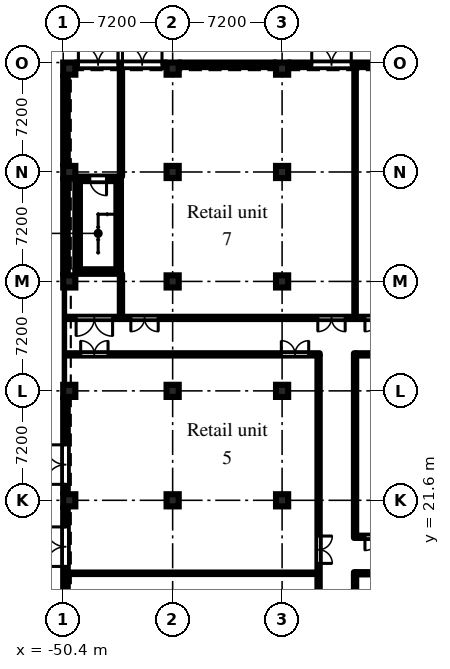
"""IFC4 building model, lengths in metres.
Left out: names, types, materials, properties, quantities, classifications, styles, units other than length and angle.
Written with IfcOpenShell. Run it as: python <this file> out.ifc"""

import sys

from ifc_helpers import new_model, si_unit, direction, frame, frame_2d, origin, origin_2d, place, context, subcontext, project, spatial, rectangle, extrude, element, fill, save


model = new_model("IFC4")
c1 = context("Model", 3, precision=1e-05, world=origin(), true_north=direction((0.0, 1.0)))
c2 = subcontext(c1, "Body", "Model", "MODEL_VIEW")
j1 = project(units=[si_unit("LENGTHUNIT", "METRE"), si_unit("PLANEANGLEUNIT", "RADIAN")], contexts=[c1])
p1 = place(None, origin())
s1 = spatial("IfcSite", under=j1, at=p1, CompositionType="ELEMENT")
p2 = place(p1, origin())
s2 = spatial("IfcBuilding", under=s1, at=p2, CompositionType="ELEMENT")
p3 = place(p2, origin())
s3 = spatial("IfcBuildingStorey", under=s2, at=p3, CompositionType="ELEMENT", Elevation=0.0)
for number, where, z_axis, x_axis in (
    (1, (-50.0, 21.6, 0.0), (0.0, 0.0, 1.0), (1.0, 0.0, 0.0)),
    (2, (-50.0, 28.8, 0.0), (0.0, 0.0, 1.0), (1.0, 0.0, 0.0)),
    (3, (-50.0, 36.0, 0.0), (0.0, 0.0, 1.0), (1.0, 0.0, 0.0)),
    (4, (-50.0, 43.2, 0.0), (0.0, 0.0, 1.0), (1.0, 0.0, 0.0)),
    (5, (-50.0, 50.0, 0.0), (0.0, 0.0, 1.0), (1.0, 0.0, 0.0)),
    (6, (-43.2, 21.6, 0.0), (0.0, 0.0, 1.0), (1.0, 0.0, 0.0)),
    (7, (-43.2, 28.8, 0.0), (0.0, 0.0, 1.0), (1.0, 0.0, 0.0)),
    (8, (-43.2, 36.0, 0.0), (0.0, 0.0, 1.0), (1.0, 0.0, 0.0)),
    (9, (-43.2, 43.2, 0.0), (0.0, 0.0, 1.0), (1.0, 0.0, 0.0)),
    (10, (-43.2, 50.0, 0.0), (0.0, 0.0, 1.0), (1.0, 0.0, 0.0)),
    (11, (-36.0, 21.6, 0.0), (0.0, 0.0, 1.0), (1.0, 0.0, 0.0)),
    (12, (-36.0, 28.8, 0.0), (0.0, 0.0, 1.0), (1.0, 0.0, 0.0)),
    (13, (-36.0, 36.0, 0.0), (0.0, 0.0, 1.0), (1.0, 0.0, 0.0)),
    (14, (-36.0, 43.2, 0.0), (0.0, 0.0, 1.0), (1.0, 0.0, 0.0)),
    (15, (-36.0, 50.0, 0.0), (0.0, 0.0, 1.0), (1.0, 0.0, 0.0)),
):
    element("IfcColumn", number, at=place(p3, frame(where, z_axis=z_axis, x_axis=x_axis)), inside=s3, PredefinedType="COLUMN", context=c2, shape_type="SweptSolid", body=[
        extrude(rectangle(XDim=0.8, YDim=0.8, at=origin_2d()), origin(), (0.0, 0.0, 1.0), 6.6),
    ])
p4 = place(p3, frame((-29.2, 50.25, 0.0), z_axis=(0.0, 0.0, 1.0), x_axis=(-1.0, 0.0, 0.0)))
e16 = element("IfcWall", 16, at=p4, inside=s3, PredefinedType="SOLIDWALL", context=c2, shape_type="SweptSolid", body=[
    extrude(rectangle(XDim=6.4, YDim=0.3, at=frame_2d((3.2, 0.0))), origin(), (0.0, 0.0, 1.0), 6.6),
])
p5 = place(p4, frame((2.25, 0.0, 0.0)))
e17 = element("IfcOpeningElement", 17, at=p5, cuts=e16, PredefinedType="OPENING", context=c2, shape_type="SweptSolid", body=[
    extrude(rectangle(XDim=2.6, YDim=2.4, at=frame_2d((1.3, 1.2))), frame((0.0, 0.16, 0.0), z_axis=(0.0, -1.0, 0.0), x_axis=(1.0, 0.0, 0.0)), (0.0, 0.0, 1.0), 0.32),
])
p6 = place(p3, frame((-36.4, 50.25, 0.0), z_axis=(0.0, 0.0, 1.0), x_axis=(-1.0, 0.0, 0.0)))
e18 = element("IfcWall", 18, at=p6, inside=s3, PredefinedType="SOLIDWALL", context=c2, shape_type="SweptSolid", body=[
    extrude(rectangle(XDim=6.4, YDim=0.3, at=frame_2d((3.2, 0.0))), origin(), (0.0, 0.0, 1.0), 6.6),
])
p7 = place(p3, frame((-43.6, 50.25, 0.0), z_axis=(0.0, 0.0, 1.0), x_axis=(-1.0, 0.0, 0.0)))
e19 = element("IfcWall", 19, at=p7, inside=s3, PredefinedType="SOLIDWALL", context=c2, shape_type="SweptSolid", body=[
    extrude(rectangle(XDim=6.0, YDim=0.3, at=frame_2d((3.0, 0.0))), origin(), (0.0, 0.0, 1.0), 6.6),
])
p8 = place(p7, frame((0.3, 0.0, 0.0)))
e20 = element("IfcOpeningElement", 20, at=p8, cuts=e19, PredefinedType="OPENING", context=c2, shape_type="SweptSolid", body=[
    extrude(rectangle(XDim=2.6, YDim=2.4, at=frame_2d((1.3, 1.2))), frame((0.0, 0.16, 0.0), z_axis=(0.0, -1.0, 0.0), x_axis=(1.0, 0.0, 0.0)), (0.0, 0.0, 1.0), 0.32),
])
p9 = place(p7, frame((3.2, 0.0, 0.0)))
e21 = element("IfcOpeningElement", 21, at=p9, cuts=e19, PredefinedType="OPENING", context=c2, shape_type="SweptSolid", body=[
    extrude(rectangle(XDim=2.6, YDim=2.4, at=frame_2d((1.3, 1.2))), frame((0.0, 0.16, 0.0), z_axis=(0.0, -1.0, 0.0), x_axis=(1.0, 0.0, 0.0)), (0.0, 0.0, 1.0), 0.32),
])
p10 = place(p3, frame((-50.25, 49.6, 0.0), z_axis=(0.0, 0.0, 1.0), x_axis=(0.0, -1.0, 0.0)))
e22 = element("IfcWall", 22, at=p10, inside=s3, PredefinedType="SOLIDWALL", context=c2, shape_type="SweptSolid", body=[
    extrude(rectangle(XDim=6.0, YDim=0.3, at=frame_2d((3.0, 0.0))), origin(), (0.0, 0.0, 1.0), 6.6),
])
p11 = place(p3, frame((-50.25, 42.8, 0.0), z_axis=(0.0, 0.0, 1.0), x_axis=(0.0, -1.0, 0.0)))
e23 = element("IfcWall", 23, at=p11, inside=s3, PredefinedType="SOLIDWALL", context=c2, shape_type="SweptSolid", body=[
    extrude(rectangle(XDim=6.4, YDim=0.3, at=frame_2d((3.2, 0.0))), origin(), (0.0, 0.0, 1.0), 6.6),
])
p12 = place(p3, frame((-50.25, 28.4, 0.0), z_axis=(0.0, 0.0, 1.0), x_axis=(0.0, -1.0, 0.0)))
e24 = element("IfcWall", 24, at=p12, inside=s3, PredefinedType="SOLIDWALL", context=c2, shape_type="SweptSolid", body=[
    extrude(rectangle(XDim=6.4, YDim=0.3, at=frame_2d((3.2, 0.0))), origin(), (0.0, 0.0, 1.0), 6.6),
])
p13 = place(p12, frame((3.15, 0.0, 0.0)))
e25 = element("IfcOpeningElement", 25, at=p13, cuts=e24, PredefinedType="OPENING", context=c2, shape_type="SweptSolid", body=[
    extrude(rectangle(XDim=2.6, YDim=2.4, at=frame_2d((1.3, 1.2))), frame((0.0, 0.16, 0.0), z_axis=(0.0, -1.0, 0.0), x_axis=(1.0, 0.0, 0.0)), (0.0, 0.0, 1.0), 0.32),
])
p14 = place(p3, frame((-50.25, 21.2, 0.0), z_axis=(0.0, 0.0, 1.0), x_axis=(0.0, -1.0, 0.0)))
e26 = element("IfcWall", 26, at=p14, inside=s3, PredefinedType="SOLIDWALL", context=c2, shape_type="SweptSolid", body=[
    extrude(rectangle(XDim=6.4, YDim=0.3, at=frame_2d((3.2, 0.0))), origin(), (0.0, 0.0, 1.0), 6.6),
])
p15 = place(p14, frame((1.35, 0.0, 0.0)))
e27 = element("IfcOpeningElement", 27, at=p15, cuts=e26, PredefinedType="OPENING", context=c2, shape_type="SweptSolid", body=[
    extrude(rectangle(XDim=2.6, YDim=2.4, at=frame_2d((1.3, 1.2))), frame((0.0, 0.16, 0.0), z_axis=(0.0, -1.0, 0.0), x_axis=(1.0, 0.0, 0.0)), (0.0, 0.0, 1.0), 0.32),
])
p16 = place(p3, frame((-49.6, 36.65, 0.0), z_axis=(0.0, 0.0, 1.0), x_axis=(1.0, 0.0, 0.0)))
e28 = element("IfcWall", 28, at=p16, inside=s3, PredefinedType="SHEAR", context=c2, shape_type="SweptSolid", body=[
    extrude(rectangle(XDim=3.0, YDim=0.3, at=frame_2d((1.5, 0.0))), origin(), (0.0, 0.0, 1.0), 6.6),
])
p17 = place(p3, frame((-49.6, 42.75, 0.0), z_axis=(0.0, 0.0, 1.0), x_axis=(1.0, 0.0, 0.0)))
e29 = element("IfcWall", 29, at=p17, inside=s3, PredefinedType="SHEAR", context=c2, shape_type="SweptSolid", body=[
    extrude(rectangle(XDim=3.0, YDim=0.3, at=frame_2d((1.5, 0.0))), origin(), (0.0, 0.0, 1.0), 6.6),
])
p18 = place(p17, frame((0.95, 0.0, 0.0)))
e30 = element("IfcOpeningElement", 30, at=p18, cuts=e29, PredefinedType="OPENING", context=c2, shape_type="SweptSolid", body=[
    extrude(rectangle(XDim=1.1, YDim=2.1, at=frame_2d((0.55, 1.05))), frame((0.0, 0.16, 0.0), z_axis=(0.0, -1.0, 0.0), x_axis=(1.0, 0.0, 0.0)), (0.0, 0.0, 1.0), 0.32),
])
for number, where, z_axis, x_axis in (
    (31, (-49.45, 36.8, 0.0), (0.0, 0.0, 1.0), (0.0, 1.0, 0.0)),
    (32, (-46.75, 36.8, 0.0), (0.0, 0.0, 1.0), (0.0, 1.0, 0.0)),
):
    element("IfcWall", number, at=place(p3, frame(where, z_axis=z_axis, x_axis=x_axis)), inside=s3, PredefinedType="SHEAR", context=c2, shape_type="SweptSolid", body=[
        extrude(rectangle(XDim=5.8, YDim=0.3, at=frame_2d((2.9, 0.0))), origin(), (0.0, 0.0, 1.0), 6.6),
    ])
p19 = place(p3, frame((-50.22, 16.8, 0.0), z_axis=(0.0, 0.0, 1.0), x_axis=(1.0, 0.0, 0.0)))
e33 = element("IfcWall", 33, at=p19, inside=s3, PredefinedType="PARTITIONING", context=c2, shape_type="SweptSolid", body=[
    extrude(rectangle(XDim=16.545, YDim=0.1, at=frame_2d((8.272, 0.0))), origin(), (0.0, 0.0, 1.0), 6.6),
])
p20 = place(p3, frame((-50.22, 31.2, 0.0), z_axis=(0.0, 0.0, 1.0), x_axis=(1.0, 0.0, 0.0)))
e34 = element("IfcWall", 34, at=p20, inside=s3, PredefinedType="PARTITIONING", context=c2, shape_type="SweptSolid", body=[
    extrude(rectangle(XDim=16.695, YDim=0.15, at=frame_2d((8.348, 0.0))), origin(), (0.0, 0.0, 1.0), 6.6),
])
p21 = place(p20, frame((0.97, 0.0, 0.0)))
e35 = element("IfcOpeningElement", 35, at=p21, cuts=e34, PredefinedType="OPENING", context=c2, shape_type="SweptSolid", body=[
    extrude(rectangle(XDim=1.8, YDim=2.1, at=frame_2d((0.9, 1.05))), frame((0.0, 0.085, 0.0), z_axis=(0.0, -1.0, 0.0), x_axis=(1.0, 0.0, 0.0)), (0.0, 0.0, 1.0), 0.17),
])
p22 = place(p20, frame((14.17, 0.0, 0.0)))
e36 = element("IfcOpeningElement", 36, at=p22, cuts=e34, PredefinedType="OPENING", context=c2, shape_type="SweptSolid", body=[
    extrude(rectangle(XDim=1.8, YDim=2.1, at=frame_2d((0.9, 1.05))), frame((0.0, 0.085, 0.0), z_axis=(0.0, -1.0, 0.0), x_axis=(1.0, 0.0, 0.0)), (0.0, 0.0, 1.0), 0.17),
])
p23 = place(p3, frame((-50.22, 33.6, 0.0), z_axis=(0.0, 0.0, 1.0), x_axis=(1.0, 0.0, 0.0)))
e37 = element("IfcWall", 37, at=p23, inside=s3, PredefinedType="PARTITIONING", context=c2, shape_type="SweptSolid", body=[
    extrude(rectangle(XDim=31.695, YDim=0.15, at=frame_2d((15.848, 0.0))), origin(), (0.0, 0.0, 1.0), 6.6),
])
p24 = place(p23, frame((0.67, 0.0, 0.0)))
e38 = element("IfcOpeningElement", 38, at=p24, cuts=e37, PredefinedType="OPENING", context=c2, shape_type="SweptSolid", body=[
    extrude(rectangle(XDim=2.4, YDim=2.1, at=frame_2d((1.2, 1.05))), frame((0.0, 0.085, 0.0), z_axis=(0.0, -1.0, 0.0), x_axis=(1.0, 0.0, 0.0)), (0.0, 0.0, 1.0), 0.17),
])
p25 = place(p23, frame((19.67, 0.0, 0.0)))
e39 = element("IfcOpeningElement", 39, at=p25, cuts=e37, PredefinedType="OPENING", context=c2, shape_type="SweptSolid", body=[
    extrude(rectangle(XDim=1.8, YDim=2.1, at=frame_2d((0.9, 1.05))), frame((0.0, 0.085, 0.0), z_axis=(0.0, -1.0, 0.0), x_axis=(1.0, 0.0, 0.0)), (0.0, 0.0, 1.0), 0.17),
])
p26 = place(p23, frame((4.27, 0.0, 0.0)))
e40 = element("IfcOpeningElement", 40, at=p26, cuts=e37, PredefinedType="OPENING", context=c2, shape_type="SweptSolid", body=[
    extrude(rectangle(XDim=1.8, YDim=2.1, at=frame_2d((0.9, 1.05))), frame((0.0, 0.085, 0.0), z_axis=(0.0, -1.0, 0.0), x_axis=(1.0, 0.0, 0.0)), (0.0, 0.0, 1.0), 0.17),
])
p27 = place(p23, frame((16.57, 0.0, 0.0)))
e41 = element("IfcOpeningElement", 41, at=p27, cuts=e37, PredefinedType="OPENING", context=c2, shape_type="SweptSolid", body=[
    extrude(rectangle(XDim=1.8, YDim=2.1, at=frame_2d((0.9, 1.05))), frame((0.0, 0.085, 0.0), z_axis=(0.0, -1.0, 0.0), x_axis=(1.0, 0.0, 0.0)), (0.0, 0.0, 1.0), 0.17),
])
p28 = place(p3, frame((-46.6, 33.675, 0.0), z_axis=(0.0, 0.0, 1.0), x_axis=(0.0, 1.0, 0.0)))
e42 = element("IfcWall", 42, at=p28, inside=s3, PredefinedType="PARTITIONING", context=c2, shape_type="SweptSolid", body=[
    extrude(rectangle(XDim=2.825, YDim=0.15, at=frame_2d((1.413, 0.0))), origin(), (0.0, 0.0, 1.0), 6.6),
])
p29 = place(p3, frame((-46.6, 42.9, 0.0), z_axis=(0.0, 0.0, 1.0), x_axis=(0.0, 1.0, 0.0)))
e43 = element("IfcWall", 43, at=p29, inside=s3, PredefinedType="PARTITIONING", context=c2, shape_type="SweptSolid", body=[
    extrude(rectangle(XDim=7.32, YDim=0.15, at=frame_2d((3.66, 0.0))), origin(), (0.0, 0.0, 1.0), 6.6),
])
p30 = place(p3, frame((-33.6, 10.325, 0.0), z_axis=(0.0, 0.0, 1.0), x_axis=(0.0, 1.0, 0.0)))
e44 = element("IfcWall", 44, at=p30, inside=s3, PredefinedType="PARTITIONING", context=c2, shape_type="SweptSolid", body=[
    extrude(rectangle(XDim=20.8, YDim=0.15, at=frame_2d((10.4, 0.0))), origin(), (0.0, 0.0, 1.0), 6.6),
])
p31 = place(p30, frame((3.425, 0.0, 0.0)))
e45 = element("IfcOpeningElement", 45, at=p31, cuts=e44, PredefinedType="OPENING", context=c2, shape_type="SweptSolid", body=[
    extrude(rectangle(XDim=1.8, YDim=2.1, at=frame_2d((0.9, 1.05))), frame((0.0, 0.085, 0.0), z_axis=(0.0, -1.0, 0.0), x_axis=(1.0, 0.0, 0.0)), (0.0, 0.0, 1.0), 0.17),
])
p32 = place(p30, frame((7.125, 0.0, 0.0)))
e46 = element("IfcOpeningElement", 46, at=p32, cuts=e44, PredefinedType="OPENING", context=c2, shape_type="SweptSolid", body=[
    extrude(rectangle(XDim=1.8, YDim=2.1, at=frame_2d((0.9, 1.05))), frame((0.0, 0.085, 0.0), z_axis=(0.0, -1.0, 0.0), x_axis=(1.0, 0.0, 0.0)), (0.0, 0.0, 1.0), 0.17),
])
p33 = place(p3, frame((-31.2, 10.325, 0.0), z_axis=(0.0, 0.0, 1.0), x_axis=(0.0, 1.0, 0.0)))
e47 = element("IfcWall", 47, at=p33, inside=s3, PredefinedType="PARTITIONING", context=c2, shape_type="SweptSolid", body=[
    extrude(rectangle(XDim=6.55, YDim=0.15, at=frame_2d((3.275, 0.0))), origin(), (0.0, 0.0, 1.0), 6.6),
])
p34 = place(p33, frame((1.175, 0.0, 0.0)))
e48 = element("IfcOpeningElement", 48, at=p34, cuts=e47, PredefinedType="OPENING", context=c2, shape_type="SweptSolid", body=[
    extrude(rectangle(XDim=1.8, YDim=2.1, at=frame_2d((0.9, 1.05))), frame((0.0, 0.085, 0.0), z_axis=(0.0, -1.0, 0.0), x_axis=(1.0, 0.0, 0.0)), (0.0, 0.0, 1.0), 0.17),
])
p35 = place(p3, frame((-31.125, 16.8, 0.0), z_axis=(0.0, 0.0, 1.0), x_axis=(1.0, 0.0, 0.0)))
e49 = element("IfcWall", 49, at=p35, inside=s3, PredefinedType="PARTITIONING", context=c2, shape_type="SweptSolid", body=[
    extrude(rectangle(XDim=12.6, YDim=0.15, at=frame_2d((6.3, 0.0))), origin(), (0.0, 0.0, 1.0), 6.6),
])
p36 = place(p3, frame((-31.2, 19.125, 0.0), z_axis=(0.0, 0.0, 1.0), x_axis=(0.0, 1.0, 0.0)))
e50 = element("IfcWall", 50, at=p36, inside=s3, PredefinedType="PARTITIONING", context=c2, shape_type="SweptSolid", body=[
    extrude(rectangle(XDim=12.15, YDim=0.15, at=frame_2d((6.075, 0.0))), origin(), (0.0, 0.0, 1.0), 6.6),
])
p37 = place(p3, frame((-31.125, 19.2, 0.0), z_axis=(0.0, 0.0, 1.0), x_axis=(1.0, 0.0, 0.0)))
e51 = element("IfcWall", 51, at=p37, inside=s3, PredefinedType="PARTITIONING", context=c2, shape_type="SweptSolid", body=[
    extrude(rectangle(XDim=12.6, YDim=0.15, at=frame_2d((6.3, 0.0))), origin(), (0.0, 0.0, 1.0), 6.6),
])
p38 = place(p37, frame((0.575, 0.0, 0.0)))
e52 = element("IfcOpeningElement", 52, at=p38, cuts=e51, PredefinedType="OPENING", context=c2, shape_type="SweptSolid", body=[
    extrude(rectangle(XDim=1.8, YDim=2.1, at=frame_2d((0.9, 1.05))), frame((0.0, 0.085, 0.0), z_axis=(0.0, -1.0, 0.0), x_axis=(1.0, 0.0, 0.0)), (0.0, 0.0, 1.0), 0.17),
])
p39 = place(p37, frame((7.137, 0.0, 0.0)))
e53 = element("IfcOpeningElement", 53, at=p39, cuts=e51, PredefinedType="OPENING", context=c2, shape_type="SweptSolid", body=[
    extrude(rectangle(XDim=1.8, YDim=2.1, at=frame_2d((0.9, 1.05))), frame((0.0, 0.085, 0.0), z_axis=(0.0, -1.0, 0.0), x_axis=(1.0, 0.0, 0.0)), (0.0, 0.0, 1.0), 0.17),
])
p40 = place(p3, frame((-31.125, 31.2, 0.0), z_axis=(0.0, 0.0, 1.0), x_axis=(1.0, 0.0, 0.0)))
e54 = element("IfcWall", 54, at=p40, inside=s3, PredefinedType="PARTITIONING", context=c2, shape_type="SweptSolid", body=[
    extrude(rectangle(XDim=12.6, YDim=0.15, at=frame_2d((6.3, 0.0))), origin(), (0.0, 0.0, 1.0), 6.6),
])
p41 = place(p40, frame((1.337, 0.0, 0.0)))
e55 = element("IfcOpeningElement", 55, at=p41, cuts=e54, PredefinedType="OPENING", context=c2, shape_type="SweptSolid", body=[
    extrude(rectangle(XDim=1.8, YDim=2.1, at=frame_2d((0.9, 1.05))), frame((0.0, 0.085, 0.0), z_axis=(0.0, -1.0, 0.0), x_axis=(1.0, 0.0, 0.0)), (0.0, 0.0, 1.0), 0.17),
])
p42 = place(p40, frame((7.375, 0.0, 0.0)))
e56 = element("IfcOpeningElement", 56, at=p42, cuts=e54, PredefinedType="OPENING", context=c2, shape_type="SweptSolid", body=[
    extrude(rectangle(XDim=1.8, YDim=2.1, at=frame_2d((0.9, 1.05))), frame((0.0, 0.085, 0.0), z_axis=(0.0, -1.0, 0.0), x_axis=(1.0, 0.0, 0.0)), (0.0, 0.0, 1.0), 0.17),
])
p43 = place(p3, frame((-31.2, 33.675, 0.0), z_axis=(0.0, 0.0, 1.0), x_axis=(0.0, 1.0, 0.0)))
e57 = element("IfcWall", 57, at=p43, inside=s3, PredefinedType="PARTITIONING", context=c2, shape_type="SweptSolid", body=[
    extrude(rectangle(XDim=16.545, YDim=0.1, at=frame_2d((8.272, 0.0))), origin(), (0.0, 0.0, 1.0), 6.6),
])
p44 = place(p5, frame((2.6, 0.0, 0.0), z_axis=(0.0, 0.0, 1.0), x_axis=(-1.0, 0.0, 0.0)))
e58 = element("IfcDoor", 58, at=p44, inside=s3, OperationType="DOUBLE_DOOR_DOUBLE_SWING", PredefinedType="DOOR", context=c2, shape_type="SweptSolid", body=[
    extrude(rectangle(XDim=2.6, YDim=2.4, at=frame_2d((1.3, 1.2))), frame((0.0, 0.025, 0.0), z_axis=(0.0, -1.0, 0.0), x_axis=(1.0, 0.0, 0.0)), (0.0, 0.0, 1.0), 0.05),
])
fill(e17, e58)
p45 = place(p8, frame((2.6, 0.0, 0.0), z_axis=(0.0, 0.0, 1.0), x_axis=(-1.0, 0.0, 0.0)))
e59 = element("IfcDoor", 59, at=p45, inside=s3, OperationType="DOUBLE_DOOR_DOUBLE_SWING", PredefinedType="DOOR", context=c2, shape_type="SweptSolid", body=[
    extrude(rectangle(XDim=2.6, YDim=2.4, at=frame_2d((1.3, 1.2))), frame((0.0, 0.025, 0.0), z_axis=(0.0, -1.0, 0.0), x_axis=(1.0, 0.0, 0.0)), (0.0, 0.0, 1.0), 0.05),
])
fill(e20, e59)
p46 = place(p9, frame((2.6, 0.0, 0.0), z_axis=(0.0, 0.0, 1.0), x_axis=(-1.0, 0.0, 0.0)))
e60 = element("IfcDoor", 60, at=p46, inside=s3, OperationType="DOUBLE_DOOR_DOUBLE_SWING", PredefinedType="DOOR", context=c2, shape_type="SweptSolid", body=[
    extrude(rectangle(XDim=2.6, YDim=2.4, at=frame_2d((1.3, 1.2))), frame((0.0, 0.025, 0.0), z_axis=(0.0, -1.0, 0.0), x_axis=(1.0, 0.0, 0.0)), (0.0, 0.0, 1.0), 0.05),
])
fill(e21, e60)
p47 = place(p13, frame((2.6, 0.0, 0.0), z_axis=(0.0, 0.0, 1.0), x_axis=(-1.0, 0.0, 0.0)))
e61 = element("IfcDoor", 61, at=p47, inside=s3, OperationType="DOUBLE_DOOR_DOUBLE_SWING", PredefinedType="DOOR", context=c2, shape_type="SweptSolid", body=[
    extrude(rectangle(XDim=2.6, YDim=2.4, at=frame_2d((1.3, 1.2))), frame((0.0, 0.025, 0.0), z_axis=(0.0, -1.0, 0.0), x_axis=(1.0, 0.0, 0.0)), (0.0, 0.0, 1.0), 0.05),
])
fill(e25, e61)
p48 = place(p15, frame((2.6, 0.0, 0.0), z_axis=(0.0, 0.0, 1.0), x_axis=(-1.0, 0.0, 0.0)))
e62 = element("IfcDoor", 62, at=p48, inside=s3, OperationType="DOUBLE_DOOR_DOUBLE_SWING", PredefinedType="DOOR", context=c2, shape_type="SweptSolid", body=[
    extrude(rectangle(XDim=2.6, YDim=2.4, at=frame_2d((1.3, 1.2))), frame((0.0, 0.025, 0.0), z_axis=(0.0, -1.0, 0.0), x_axis=(1.0, 0.0, 0.0)), (0.0, 0.0, 1.0), 0.05),
])
fill(e27, e62)
p49 = place(p18, frame((1.1, 0.0, 0.0), z_axis=(0.0, 0.0, 1.0), x_axis=(-1.0, 0.0, 0.0)))
e63 = element("IfcDoor", 63, at=p49, inside=s3, OperationType="SINGLE_SWING_LEFT", PredefinedType="DOOR", context=c2, shape_type="SweptSolid", body=[
    extrude(rectangle(XDim=1.1, YDim=2.1, at=frame_2d((0.55, 1.05))), frame((0.0, 0.025, 0.0), z_axis=(0.0, -1.0, 0.0), x_axis=(1.0, 0.0, 0.0)), (0.0, 0.0, 1.0), 0.05),
])
fill(e30, e63)
p50 = place(p24, frame((2.4, 0.0, 0.0), z_axis=(0.0, 0.0, 1.0), x_axis=(-1.0, 0.0, 0.0)))
e64 = element("IfcDoor", 64, at=p50, inside=s3, OperationType="DOUBLE_DOOR_DOUBLE_SWING", PredefinedType="DOOR", context=c2, shape_type="SweptSolid", body=[
    extrude(rectangle(XDim=2.4, YDim=2.1, at=frame_2d((1.2, 1.05))), frame((0.0, 0.025, 0.0), z_axis=(0.0, -1.0, 0.0), x_axis=(1.0, 0.0, 0.0)), (0.0, 0.0, 1.0), 0.05),
])
fill(e38, e64)
p51 = place(p38, frame((1.8, 0.0, 0.0), z_axis=(0.0, 0.0, 1.0), x_axis=(-1.0, 0.0, 0.0)))
e65 = element("IfcDoor", 65, at=p51, inside=s3, OperationType="DOUBLE_DOOR_DOUBLE_SWING", PredefinedType="DOOR", context=c2, shape_type="SweptSolid", body=[
    extrude(rectangle(XDim=1.8, YDim=2.1, at=frame_2d((0.9, 1.05))), frame((0.0, 0.025, 0.0), z_axis=(0.0, -1.0, 0.0), x_axis=(1.0, 0.0, 0.0)), (0.0, 0.0, 1.0), 0.05),
])
fill(e52, e65)
p52 = place(p21, origin())
e66 = element("IfcDoor", 66, at=p52, inside=s3, OperationType="DOUBLE_DOOR_DOUBLE_SWING", PredefinedType="DOOR", context=c2, shape_type="SweptSolid", body=[
    extrude(rectangle(XDim=1.8, YDim=2.1, at=frame_2d((0.9, 1.05))), frame((0.0, 0.025, 0.0), z_axis=(0.0, -1.0, 0.0), x_axis=(1.0, 0.0, 0.0)), (0.0, 0.0, 1.0), 0.05),
])
fill(e35, e66)
p53 = place(p22, origin())
e67 = element("IfcDoor", 67, at=p53, inside=s3, OperationType="DOUBLE_DOOR_DOUBLE_SWING", PredefinedType="DOOR", context=c2, shape_type="SweptSolid", body=[
    extrude(rectangle(XDim=1.8, YDim=2.1, at=frame_2d((0.9, 1.05))), frame((0.0, 0.025, 0.0), z_axis=(0.0, -1.0, 0.0), x_axis=(1.0, 0.0, 0.0)), (0.0, 0.0, 1.0), 0.05),
])
fill(e36, e67)
p54 = place(p32, frame((1.8, 0.0, 0.0), z_axis=(0.0, 0.0, 1.0), x_axis=(-1.0, 0.0, 0.0)))
e68 = element("IfcDoor", 68, at=p54, inside=s3, OperationType="DOUBLE_DOOR_DOUBLE_SWING", PredefinedType="DOOR", context=c2, shape_type="SweptSolid", body=[
    extrude(rectangle(XDim=1.8, YDim=2.1, at=frame_2d((0.9, 1.05))), frame((0.0, 0.025, 0.0), z_axis=(0.0, -1.0, 0.0), x_axis=(1.0, 0.0, 0.0)), (0.0, 0.0, 1.0), 0.05),
])
fill(e46, e68)
p55 = place(p25, frame((1.8, 0.0, 0.0), z_axis=(0.0, 0.0, 1.0), x_axis=(-1.0, 0.0, 0.0)))
e69 = element("IfcDoor", 69, at=p55, inside=s3, OperationType="DOUBLE_DOOR_DOUBLE_SWING", PredefinedType="DOOR", context=c2, shape_type="SweptSolid", body=[
    extrude(rectangle(XDim=1.8, YDim=2.1, at=frame_2d((0.9, 1.05))), frame((0.0, 0.025, 0.0), z_axis=(0.0, -1.0, 0.0), x_axis=(1.0, 0.0, 0.0)), (0.0, 0.0, 1.0), 0.05),
])
fill(e39, e69)
p56 = place(p26, frame((1.8, 0.0, 0.0), z_axis=(0.0, 0.0, 1.0), x_axis=(-1.0, 0.0, 0.0)))
e70 = element("IfcDoor", 70, at=p56, inside=s3, OperationType="DOUBLE_DOOR_DOUBLE_SWING", PredefinedType="DOOR", context=c2, shape_type="SweptSolid", body=[
    extrude(rectangle(XDim=1.8, YDim=2.1, at=frame_2d((0.9, 1.05))), frame((0.0, 0.025, 0.0), z_axis=(0.0, -1.0, 0.0), x_axis=(1.0, 0.0, 0.0)), (0.0, 0.0, 1.0), 0.05),
])
fill(e40, e70)
p57 = place(p27, frame((1.8, 0.0, 0.0), z_axis=(0.0, 0.0, 1.0), x_axis=(-1.0, 0.0, 0.0)))
e71 = element("IfcDoor", 71, at=p57, inside=s3, OperationType="DOUBLE_DOOR_DOUBLE_SWING", PredefinedType="DOOR", context=c2, shape_type="SweptSolid", body=[
    extrude(rectangle(XDim=1.8, YDim=2.1, at=frame_2d((0.9, 1.05))), frame((0.0, 0.025, 0.0), z_axis=(0.0, -1.0, 0.0), x_axis=(1.0, 0.0, 0.0)), (0.0, 0.0, 1.0), 0.05),
])
fill(e41, e71)
save(model, sys.argv[1])
